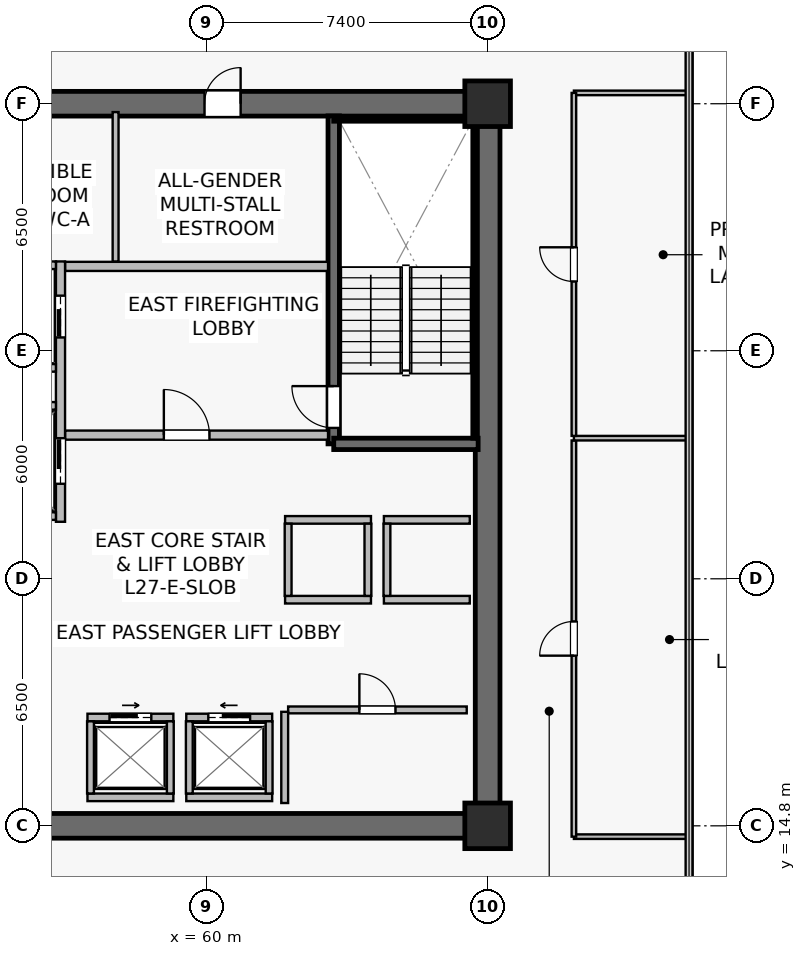
"""IFC4 building model, lengths in metres.
Left out: names, types, materials, properties, quantities, classifications, styles, units other than length and angle.
Written with IfcOpenShell. Run it as: python <this file> out.ifc"""

import sys

from ifc_helpers import new_model, si_unit, direction, frame, frame_2d, origin, origin_2d, place, context, subcontext, project, spatial, rectangle, extrude, source, transform, mapped, element, fill, save


model = new_model("IFC4")
c1 = context("Model", 3, precision=1e-05, world=origin(), true_north=direction((0.0, 1.0)))
c2 = subcontext(c1, "Body", "Model", "MODEL_VIEW")
j1 = project(units=[si_unit("LENGTHUNIT", "METRE"), si_unit("PLANEANGLEUNIT", "RADIAN")], contexts=[c1])
p1 = place(None, origin())
s1 = spatial("IfcSite", under=j1, at=p1, CompositionType="ELEMENT")
p2 = place(p1, origin())
s2 = spatial("IfcBuilding", under=s1, at=p2, CompositionType="ELEMENT")
p3 = place(p2, frame((0.0, 0.0, 113.3)))
s3 = spatial("IfcBuildingStorey", under=s2, at=p3, CompositionType="ELEMENT", Elevation=113.3)
p4 = place(p3, frame((52.275, 14.8, 0.0), z_axis=(0.0, 0.0, 1.0), x_axis=(1.0, 0.0, 0.0)))
e1 = element("IfcWall", 1, at=p4, inside=s3, PredefinedType="SHEAR", context=c2, shape_type="SweptSolid", body=[
    extrude(rectangle(XDim=15.45, YDim=0.65, at=frame_2d((7.725, 0.0))), origin(), (0.0, 0.0, 1.0), 3.79),
])
p5 = place(p3, frame((52.275, 33.8, 0.0), z_axis=(0.0, 0.0, 1.0), x_axis=(1.0, 0.0, 0.0)))
e2 = element("IfcWall", 2, at=p5, inside=s3, PredefinedType="SHEAR", context=c2, shape_type="SweptSolid", body=[
    extrude(rectangle(XDim=15.45, YDim=0.65, at=frame_2d((7.725, 0.0))), origin(), (0.0, 0.0, 1.0), 3.79),
])
p6 = place(p5, frame((7.675, 0.0, 0.0)))
e3 = element("IfcOpeningElement", 3, at=p6, cuts=e2, PredefinedType="OPENING", context=c2, shape_type="SweptSolid", body=[
    extrude(rectangle(XDim=0.95, YDim=2.15, at=frame_2d((0.475, 1.075))), frame((0.0, 0.335, 0.0), z_axis=(0.0, -1.0, 0.0), x_axis=(1.0, 0.0, 0.0)), (0.0, 0.0, 1.0), 0.67),
])
p7 = place(p5, frame((2.61, 0.0, 0.0)))
e4 = element("IfcOpeningElement", 4, at=p7, cuts=e2, PredefinedType="OPENING", context=c2, shape_type="SweptSolid", body=[
    extrude(rectangle(XDim=0.95, YDim=2.15, at=frame_2d((0.475, 1.075))), frame((0.0, 0.335, 0.0), z_axis=(0.0, -1.0, 0.0), x_axis=(1.0, 0.0, 0.0)), (0.0, 0.0, 1.0), 0.67),
])
p8 = place(p3, frame((67.4, 15.125, 0.0), z_axis=(0.0, 0.0, 1.0), x_axis=(0.0, 1.0, 0.0)))
e5 = element("IfcWall", 5, at=p8, inside=s3, PredefinedType="SHEAR", context=c2, shape_type="SweptSolid", body=[
    extrude(rectangle(XDim=18.35, YDim=0.65, at=frame_2d((9.175, 0.0))), origin(), (0.0, 0.0, 1.0), 3.79),
])
p9 = place(p3, frame((63.35, 24.85, 0.0), z_axis=(0.0, 0.0, 1.0), x_axis=(0.0, 1.0, 0.0)))
e6 = element("IfcWall", 6, at=p9, inside=s3, PredefinedType="SHEAR", context=c2, shape_type="SweptSolid", body=[
    extrude(rectangle(XDim=8.63, YDim=0.3, at=frame_2d((4.315, 0.0))), origin(), (0.0, 0.0, 1.0), 3.79),
])
p10 = place(p9, frame((0.42, 0.0, 0.0)))
e7 = element("IfcOpeningElement", 7, at=p10, cuts=e6, PredefinedType="OPENING", context=c2, shape_type="SweptSolid", body=[
    extrude(rectangle(XDim=1.1, YDim=2.15, at=frame_2d((0.55, 1.075))), frame((0.0, 0.16, 0.0), z_axis=(0.0, -1.0, 0.0), x_axis=(1.0, 0.0, 0.0)), (0.0, 0.0, 1.0), 0.32),
])
p11 = place(p3, frame((63.35, 24.85, 0.0), z_axis=(0.0, 0.0, 1.0), x_axis=(1.0, 0.0, 0.0)))
e8 = element("IfcWall", 8, at=p11, inside=s3, PredefinedType="SHEAR", context=c2, shape_type="SweptSolid", body=[
    extrude(rectangle(XDim=3.8, YDim=0.3, at=frame_2d((1.9, 0.0))), origin(), (0.0, 0.0, 1.0), 3.79),
])
p12 = place(p3, frame((63.35, 33.4, 0.0), z_axis=(0.0, 0.0, 1.0), x_axis=(1.0, 0.0, 0.0)))
e9 = element("IfcWall", 9, at=p12, inside=s3, PredefinedType="SOLIDWALL", context=c2, shape_type="SweptSolid", body=[
    extrude(rectangle(XDim=3.72, YDim=0.12, at=frame_2d((1.86, 0.0))), origin(), (0.0, 0.0, 1.0), 3.79),
])
p13 = place(p3, frame((67.07, 25.0, 0.0), z_axis=(0.0, 0.0, 1.0), x_axis=(0.0, 1.0, 0.0)))
e10 = element("IfcWall", 10, at=p13, inside=s3, PredefinedType="SOLIDWALL", context=c2, shape_type="SweptSolid", body=[
    extrude(rectangle(XDim=8.32, YDim=0.12, at=frame_2d((4.16, 0.0))), origin(), (0.0, 0.0, 1.0), 3.79),
])
m1 = source(origin(), c2, "Body", "SweptSolid", [
    extrude(rectangle(XDim=1.2, YDim=1.2, at=origin_2d()), origin(), (0.0, 0.0, 1.0), 4.1),
])
for number, where, z_axis, x_axis in (
    (11, (67.4, 14.8, 0.0), (0.0, 0.0, 1.0), (1.0, 0.0, 0.0)),
    (12, (67.4, 33.8, 0.0), (0.0, 0.0, 1.0), (1.0, 0.0, 0.0)),
):
    element("IfcColumn", number, at=place(p3, frame(where, z_axis=z_axis, x_axis=x_axis)), inside=s3, PredefinedType="COLUMN", context=c2, shape_type="MappedRepresentation", body=[
        mapped(m1, transform((0.0, 0.0, 0.0), scale=1.0)),
    ])
p14 = place(p3, frame((56.28, 25.08, 0.0), z_axis=(0.0, 0.0, 1.0), x_axis=(1.0, 0.0, 0.0)))
e13 = element("IfcWall", 13, at=p14, inside=s3, PredefinedType="SOLIDWALL", context=c2, shape_type="SweptSolid", body=[
    extrude(rectangle(XDim=6.92, YDim=0.24, at=frame_2d((3.46, 0.0))), origin(), (0.0, 0.0, 1.0), 3.125),
])
p15 = place(p14, frame((2.6, 0.0, 0.0)))
e14 = element("IfcOpeningElement", 14, at=p15, cuts=e13, PredefinedType="OPENING", context=c2, shape_type="SweptSolid", body=[
    extrude(rectangle(XDim=1.2, YDim=2.16, at=frame_2d((0.6, 1.08))), frame((0.0, 0.13, 0.0), z_axis=(0.0, -1.0, 0.0), x_axis=(1.0, 0.0, 0.0)), (0.0, 0.0, 1.0), 0.26),
])
p16 = place(p3, frame((56.28, 29.52, 0.0), z_axis=(0.0, 0.0, 1.0), x_axis=(1.0, 0.0, 0.0)))
e15 = element("IfcWall", 15, at=p16, inside=s3, PredefinedType="SOLIDWALL", context=c2, shape_type="SweptSolid", body=[
    extrude(rectangle(XDim=6.92, YDim=0.24, at=frame_2d((3.46, 0.0))), origin(), (0.0, 0.0, 1.0), 3.125),
])
p17 = place(p3, frame((56.16, 22.8, 0.0), z_axis=(0.0, 0.0, 1.0), x_axis=(0.0, 1.0, 0.0)))
e16 = element("IfcWall", 16, at=p17, inside=s3, PredefinedType="SOLIDWALL", context=c2, shape_type="SweptSolid", body=[
    extrude(rectangle(XDim=6.85, YDim=0.24, at=frame_2d((3.425, 0.0))), origin(), (0.0, 0.0, 1.0), 2.875),
])
p18 = place(p17, frame((4.85, 0.0, 0.0)))
e17 = element("IfcOpeningElement", 17, at=p18, cuts=e16, PredefinedType="OPENING", context=c2, shape_type="SweptSolid", body=[
    extrude(rectangle(XDim=1.1, YDim=2.22, at=frame_2d((0.55, 1.11))), frame((0.0, 0.13, 0.0), z_axis=(0.0, -1.0, 0.0), x_axis=(1.0, 0.0, 0.0)), (0.0, 0.0, 1.0), 0.26),
])
p19 = place(p17, frame((1.0, 0.0, 0.0)))
e18 = element("IfcOpeningElement", 18, at=p19, cuts=e16, PredefinedType="OPENING", context=c2, shape_type="SweptSolid", body=[
    extrude(rectangle(XDim=1.2, YDim=2.22, at=frame_2d((0.6, 1.11))), frame((0.0, 0.13, 0.0), z_axis=(0.0, -1.0, 0.0), x_axis=(1.0, 0.0, 0.0)), (0.0, 0.0, 1.0), 0.26),
])
p20 = place(p3, frame((59.47, 17.65, 0.0), z_axis=(0.0, 0.0, 1.0), x_axis=(1.0, 0.0, 0.0)))
e19 = element("IfcWall", 19, at=p20, inside=s3, PredefinedType="SOLIDWALL", context=c2, shape_type="SweptSolid", body=[
    extrude(rectangle(XDim=2.26, YDim=0.2, at=frame_2d((1.13, 0.0))), origin(), (0.0, 0.0, 1.0), 3.125),
])
p21 = place(p20, frame((0.58, 0.0, 0.0)))
e20 = element("IfcOpeningElement", 20, at=p21, cuts=e19, PredefinedType="OPENING", context=c2, shape_type="SweptSolid", body=[
    extrude(rectangle(XDim=1.1, YDim=2.22, at=frame_2d((0.55, 1.11))), frame((0.0, 0.11, 0.0), z_axis=(0.0, -1.0, 0.0), x_axis=(1.0, 0.0, 0.0)), (0.0, 0.0, 1.0), 0.22),
])
p22 = place(p3, frame((59.47, 15.55, 0.0), z_axis=(0.0, 0.0, 1.0), x_axis=(1.0, 0.0, 0.0)))
e21 = element("IfcWall", 21, at=p22, inside=s3, PredefinedType="SOLIDWALL", context=c2, shape_type="SweptSolid", body=[
    extrude(rectangle(XDim=2.26, YDim=0.2, at=frame_2d((1.13, 0.0))), origin(), (0.0, 0.0, 1.0), 3.125),
])
for number, where, z_axis, x_axis in (
    (22, (59.55, 15.65, 0.0), (0.0, 0.0, 1.0), (0.0, 1.0, 0.0)),
    (23, (61.65, 15.65, 0.0), (0.0, 0.0, 1.0), (0.0, 1.0, 0.0)),
):
    element("IfcWall", number, at=place(p3, frame(where, z_axis=z_axis, x_axis=x_axis)), inside=s3, PredefinedType="SOLIDWALL", context=c2, shape_type="SweptSolid", body=[
        extrude(rectangle(XDim=1.9, YDim=0.18, at=frame_2d((0.95, 0.0))), origin(), (0.0, 0.0, 1.0), 3.79),
    ])
p23 = place(p3, frame((56.87, 17.65, 0.0), z_axis=(0.0, 0.0, 1.0), x_axis=(1.0, 0.0, 0.0)))
e24 = element("IfcWall", 24, at=p23, inside=s3, PredefinedType="SOLIDWALL", context=c2, shape_type="SweptSolid", body=[
    extrude(rectangle(XDim=2.26, YDim=0.2, at=frame_2d((1.13, 0.0))), origin(), (0.0, 0.0, 1.0), 3.79),
])
p24 = place(p23, frame((0.58, 0.0, 0.0)))
e25 = element("IfcOpeningElement", 25, at=p24, cuts=e24, PredefinedType="OPENING", context=c2, shape_type="SweptSolid", body=[
    extrude(rectangle(XDim=1.1, YDim=2.22, at=frame_2d((0.55, 1.11))), frame((0.0, 0.11, 0.0), z_axis=(0.0, -1.0, 0.0), x_axis=(1.0, 0.0, 0.0)), (0.0, 0.0, 1.0), 0.22),
])
p25 = place(p3, frame((56.87, 15.55, 0.0), z_axis=(0.0, 0.0, 1.0), x_axis=(1.0, 0.0, 0.0)))
e26 = element("IfcWall", 26, at=p25, inside=s3, PredefinedType="SOLIDWALL", context=c2, shape_type="SweptSolid", body=[
    extrude(rectangle(XDim=2.26, YDim=0.2, at=frame_2d((1.13, 0.0))), origin(), (0.0, 0.0, 1.0), 3.79),
])
for number, where, z_axis, x_axis in (
    (27, (56.95, 15.65, 0.0), (0.0, 0.0, 1.0), (0.0, 1.0, 0.0)),
    (28, (59.05, 15.65, 0.0), (0.0, 0.0, 1.0), (0.0, 1.0, 0.0)),
):
    element("IfcWall", number, at=place(p3, frame(where, z_axis=z_axis, x_axis=x_axis)), inside=s3, PredefinedType="SOLIDWALL", context=c2, shape_type="SweptSolid", body=[
        extrude(rectangle(XDim=1.9, YDim=0.18, at=frame_2d((0.95, 0.0))), origin(), (0.0, 0.0, 1.0), 3.79),
    ])
for number, where, z_axis, x_axis in (
    (29, (64.67, 20.75, 0.0), (0.0, 0.0, 1.0), (1.0, 0.0, 0.0)),
    (30, (64.67, 22.85, 0.0), (0.0, 0.0, 1.0), (1.0, 0.0, 0.0)),
):
    element("IfcWall", number, at=place(p3, frame(where, z_axis=z_axis, x_axis=x_axis)), inside=s3, PredefinedType="SOLIDWALL", context=c2, shape_type="SweptSolid", body=[
        extrude(rectangle(XDim=2.26, YDim=0.2, at=frame_2d((1.13, 0.0))), origin(), (0.0, 0.0, 1.0), 3.79),
    ])
p26 = place(p3, frame((64.75, 20.85, 0.0), z_axis=(0.0, 0.0, 1.0), x_axis=(0.0, 1.0, 0.0)))
e31 = element("IfcWall", 31, at=p26, inside=s3, PredefinedType="SOLIDWALL", context=c2, shape_type="SweptSolid", body=[
    extrude(rectangle(XDim=1.9, YDim=0.18, at=frame_2d((0.95, 0.0))), origin(), (0.0, 0.0, 1.0), 3.79),
])
for number, where, z_axis, x_axis in (
    (32, (62.07, 20.75, 0.0), (0.0, 0.0, 1.0), (1.0, 0.0, 0.0)),
    (33, (62.07, 22.85, 0.0), (0.0, 0.0, 1.0), (1.0, 0.0, 0.0)),
):
    element("IfcWall", number, at=place(p3, frame(where, z_axis=z_axis, x_axis=x_axis)), inside=s3, PredefinedType="SOLIDWALL", context=c2, shape_type="SweptSolid", body=[
        extrude(rectangle(XDim=2.26, YDim=0.2, at=frame_2d((1.13, 0.0))), origin(), (0.0, 0.0, 1.0), 3.79),
    ])
for number, where, z_axis, x_axis in (
    (34, (62.15, 20.85, 0.0), (0.0, 0.0, 1.0), (0.0, 1.0, 0.0)),
    (35, (64.25, 20.85, 0.0), (0.0, 0.0, 1.0), (0.0, 1.0, 0.0)),
):
    element("IfcWall", number, at=place(p3, frame(where, z_axis=z_axis, x_axis=x_axis)), inside=s3, PredefinedType="SOLIDWALL", context=c2, shape_type="SweptSolid", body=[
        extrude(rectangle(XDim=1.9, YDim=0.18, at=frame_2d((0.95, 0.0))), origin(), (0.0, 0.0, 1.0), 3.79),
    ])
p27 = place(p3, frame((53.85, 29.55, 0.0), z_axis=(0.0, 0.0, 1.0), x_axis=(1.0, 0.0, 0.0)))
e36 = element("IfcWall", 36, at=p27, inside=s3, PredefinedType="SOLIDWALL", context=c2, shape_type="SweptSolid", body=[
    extrude(rectangle(XDim=2.19, YDim=0.2, at=frame_2d((1.095, 0.0))), origin(), (0.0, 0.0, 1.0), 3.79),
])
p28 = place(p3, frame((53.85, 26.85, 0.0), z_axis=(0.0, 0.0, 1.0), x_axis=(1.0, 0.0, 0.0)))
e37 = element("IfcWall", 37, at=p28, inside=s3, PredefinedType="SOLIDWALL", context=c2, shape_type="SweptSolid", body=[
    extrude(rectangle(XDim=2.19, YDim=0.2, at=frame_2d((1.095, 0.0))), origin(), (0.0, 0.0, 1.0), 3.187),
])
for number, where, z_axis, x_axis in (
    (38, (53.85, 25.85, 0.0), (0.0, 0.0, 1.0), (1.0, 0.0, 0.0)),
    (39, (53.85, 22.95, 0.0), (0.0, 0.0, 1.0), (1.0, 0.0, 0.0)),
):
    element("IfcWall", number, at=place(p3, frame(where, z_axis=z_axis, x_axis=x_axis)), inside=s3, PredefinedType="SOLIDWALL", context=c2, shape_type="SweptSolid", body=[
        extrude(rectangle(XDim=2.19, YDim=0.2, at=frame_2d((1.095, 0.0))), origin(), (0.0, 0.0, 1.0), 3.79),
    ])
p29 = place(p3, frame((62.15, 17.85, 0.0), z_axis=(0.0, 0.0, 1.0), x_axis=(1.0, 0.0, 0.0)))
e40 = element("IfcWall", 40, at=p29, inside=s3, PredefinedType="SOLIDWALL", context=c2, shape_type="SweptSolid", body=[
    extrude(rectangle(XDim=4.7, YDim=0.18, at=frame_2d((2.35, 0.0))), origin(), (0.0, 0.0, 1.0), 3.79),
])
p30 = place(p29, frame((1.875, 0.0, 0.0)))
e41 = element("IfcOpeningElement", 41, at=p30, cuts=e40, PredefinedType="OPENING", context=c2, shape_type="SweptSolid", body=[
    extrude(rectangle(XDim=0.95, YDim=2.15, at=frame_2d((0.475, 1.075))), frame((0.0, 0.1, 0.0), z_axis=(0.0, -1.0, 0.0), x_axis=(1.0, 0.0, 0.0)), (0.0, 0.0, 1.0), 0.2),
])
p31 = place(p3, frame((62.06, 15.4, 0.0), z_axis=(0.0, 0.0, 1.0), x_axis=(0.0, 1.0, 0.0)))
e42 = element("IfcWall", 42, at=p31, inside=s3, PredefinedType="SOLIDWALL", context=c2, shape_type="SweptSolid", body=[
    extrude(rectangle(XDim=2.4, YDim=0.18, at=frame_2d((1.2, 0.0))), origin(), (0.0, 0.0, 1.0), 3.79),
])
p32 = place(p3, frame((57.61, 29.65, 0.0), z_axis=(0.0, 0.0, 1.0), x_axis=(0.0, 1.0, 0.0)))
e43 = element("IfcWall", 43, at=p32, inside=s3, PredefinedType="PLUMBINGWALL", context=c2, shape_type="SweptSolid", body=[
    extrude(rectangle(XDim=3.93, YDim=0.155, at=frame_2d((1.965, 0.0))), origin(), (0.0, 0.0, 1.0), 3.79),
])
for number, where, z_axis, x_axis in (
    (44, (69.67, 14.515, 0.0), (0.0, 0.0, 1.0), (1.0, 0.0, 0.0)),
    (45, (69.67, 34.085, 0.0), (0.0, 0.0, 1.0), (1.0, 0.0, 0.0)),
):
    element("IfcWall", number, at=place(p3, frame(where, z_axis=z_axis, x_axis=x_axis)), inside=s3, PredefinedType="PARTITIONING", context=c2, shape_type="SweptSolid", body=[
        extrude(rectangle(XDim=3.02, YDim=0.12, at=frame_2d((1.51, 0.0))), origin(), (0.0, 0.0, 1.0), 3.79),
    ])
p33 = place(p3, frame((69.67, 14.515, 0.0), z_axis=(0.0, 0.0, 1.0), x_axis=(0.0, 1.0, 0.0)))
e46 = element("IfcWall", 46, at=p33, inside=s3, PredefinedType="PARTITIONING", context=c2, shape_type="SweptSolid", body=[
    extrude(rectangle(XDim=10.425, YDim=0.12, at=frame_2d((5.212, 0.0))), origin(), (0.0, 0.0, 1.0), 3.79),
])
p34 = place(p33, frame((4.762, 0.0, 0.0)))
e47 = element("IfcOpeningElement", 47, at=p34, cuts=e46, PredefinedType="OPENING", context=c2, shape_type="SweptSolid", body=[
    extrude(rectangle(XDim=0.9, YDim=2.1, at=frame_2d((0.45, 1.05))), frame((0.0, 0.07, 0.0), z_axis=(0.0, -1.0, 0.0), x_axis=(1.0, 0.0, 0.0)), (0.0, 0.0, 1.0), 0.14),
])
p35 = place(p3, frame((69.67, 25.0, 0.0), z_axis=(0.0, 0.0, 1.0), x_axis=(1.0, 0.0, 0.0)))
e48 = element("IfcWall", 48, at=p35, inside=s3, PredefinedType="PARTITIONING", context=c2, shape_type="SweptSolid", body=[
    extrude(rectangle(XDim=3.02, YDim=0.12, at=frame_2d((1.51, 0.0))), origin(), (0.0, 0.0, 1.0), 3.79),
])
p36 = place(p3, frame((69.67, 25.06, 0.0), z_axis=(0.0, 0.0, 1.0), x_axis=(0.0, 1.0, 0.0)))
e49 = element("IfcWall", 49, at=p36, inside=s3, PredefinedType="PARTITIONING", context=c2, shape_type="SweptSolid", body=[
    extrude(rectangle(XDim=9.025, YDim=0.12, at=frame_2d((4.512, 0.0))), origin(), (0.0, 0.0, 1.0), 3.79),
])
p37 = place(p36, frame((4.062, 0.0, 0.0)))
e50 = element("IfcOpeningElement", 50, at=p37, cuts=e49, PredefinedType="OPENING", context=c2, shape_type="SweptSolid", body=[
    extrude(rectangle(XDim=0.9, YDim=2.1, at=frame_2d((0.45, 1.05))), frame((0.0, 0.07, 0.0), z_axis=(0.0, -1.0, 0.0), x_axis=(1.0, 0.0, 0.0)), (0.0, 0.0, 1.0), 0.14),
])
m2 = source(origin(), c2, "Body", "SweptSolid", [
    extrude(rectangle(XDim=1.1, YDim=2.15, at=frame_2d((0.55, 1.075))), frame((0.0, 0.025, 0.0), z_axis=(0.0, -1.0, 0.0), x_axis=(1.0, 0.0, 0.0)), (0.0, 0.0, 1.0), 0.05),
])
p38 = place(p10, origin())
e51 = element("IfcDoor", 51, at=p38, inside=s3, OperationType="SINGLE_SWING_RIGHT", PredefinedType="DOOR", context=c2, shape_type="MappedRepresentation", body=[
    mapped(m2, transform((0.0, 0.0, 0.0), scale=1.0)),
])
fill(e7, e51)
m3 = source(origin(), c2, "Body", "SweptSolid", [
    extrude(rectangle(XDim=1.2, YDim=2.16, at=frame_2d((0.6, 1.08))), frame((0.0, 0.025, 0.0), z_axis=(0.0, -1.0, 0.0), x_axis=(1.0, 0.0, 0.0)), (0.0, 0.0, 1.0), 0.05),
])
p39 = place(p15, origin())
e52 = element("IfcDoor", 52, at=p39, inside=s3, OperationType="SINGLE_SWING_LEFT", PredefinedType="DOOR", context=c2, shape_type="MappedRepresentation", body=[
    mapped(m3, transform((0.0, 0.0, 0.0), scale=1.0)),
])
fill(e14, e52)
m4 = source(origin(), c2, "Body", "SweptSolid", [
    extrude(rectangle(XDim=1.1, YDim=2.22, at=frame_2d((0.55, 1.11))), frame((0.0, 0.025, 0.0), z_axis=(0.0, -1.0, 0.0), x_axis=(1.0, 0.0, 0.0)), (0.0, 0.0, 1.0), 0.05),
])
p40 = place(p21, origin())
e53 = element("IfcDoor", 53, at=p40, inside=s3, OperationType="SLIDING_TO_LEFT", PredefinedType="USERDEFINED", context=c2, shape_type="MappedRepresentation", body=[
    mapped(m4, transform((0.0, 0.0, 0.0), scale=1.0)),
])
fill(e20, e53)
p41 = place(p24, origin())
e54 = element("IfcDoor", 54, at=p41, inside=s3, OperationType="SLIDING_TO_RIGHT", PredefinedType="USERDEFINED", context=c2, shape_type="MappedRepresentation", body=[
    mapped(m4, transform((0.0, 0.0, 0.0), scale=1.0)),
])
fill(e25, e54)
p42 = place(p18, origin())
e55 = element("IfcDoor", 55, at=p42, inside=s3, OperationType="SLIDING_TO_RIGHT", PredefinedType="USERDEFINED", context=c2, shape_type="MappedRepresentation", body=[
    mapped(m4, transform((0.0, 0.0, 0.0), scale=1.0)),
])
fill(e17, e55)
m5 = source(origin(), c2, "Body", "SweptSolid", [
    extrude(rectangle(XDim=1.2, YDim=2.22, at=frame_2d((0.6, 1.11))), frame((0.0, 0.025, 0.0), z_axis=(0.0, -1.0, 0.0), x_axis=(1.0, 0.0, 0.0)), (0.0, 0.0, 1.0), 0.05),
])
p43 = place(p19, origin())
e56 = element("IfcDoor", 56, at=p43, inside=s3, OperationType="SLIDING_TO_LEFT", PredefinedType="USERDEFINED", context=c2, shape_type="MappedRepresentation", body=[
    mapped(m5, transform((0.0, 0.0, 0.0), scale=1.0)),
])
fill(e18, e56)
m6 = source(origin(), c2, "Body", "SweptSolid", [
    extrude(rectangle(XDim=0.95, YDim=2.15, at=frame_2d((0.475, 1.075))), frame((0.0, 0.025, 0.0), z_axis=(0.0, -1.0, 0.0), x_axis=(1.0, 0.0, 0.0)), (0.0, 0.0, 1.0), 0.05),
])
p44 = place(p30, origin())
e57 = element("IfcDoor", 57, at=p44, inside=s3, OperationType="SINGLE_SWING_LEFT", PredefinedType="DOOR", context=c2, shape_type="MappedRepresentation", body=[
    mapped(m6, transform((0.0, 0.0, 0.0), scale=1.0)),
])
fill(e41, e57)
p45 = place(p6, origin())
e58 = element("IfcDoor", 58, at=p45, inside=s3, OperationType="SINGLE_SWING_RIGHT", PredefinedType="DOOR", context=c2, shape_type="MappedRepresentation", body=[
    mapped(m6, transform((0.0, 0.0, 0.0), scale=1.0)),
])
fill(e3, e58)
m7 = source(origin(), c2, "Body", "SweptSolid", [
    extrude(rectangle(XDim=0.9, YDim=2.1, at=frame_2d((0.45, 1.05))), frame((0.0, 0.025, 0.0), z_axis=(0.0, -1.0, 0.0), x_axis=(1.0, 0.0, 0.0)), (0.0, 0.0, 1.0), 0.05),
])
p46 = place(p34, origin())
e59 = element("IfcDoor", 59, at=p46, inside=s3, OperationType="SINGLE_SWING_LEFT", PredefinedType="DOOR", context=c2, shape_type="MappedRepresentation", body=[
    mapped(m7, transform((0.0, 0.0, 0.0), scale=1.0)),
])
fill(e47, e59)
p47 = place(p37, origin())
e60 = element("IfcDoor", 60, at=p47, inside=s3, OperationType="SINGLE_SWING_RIGHT", PredefinedType="DOOR", context=c2, shape_type="MappedRepresentation", body=[
    mapped(m7, transform((0.0, 0.0, 0.0), scale=1.0)),
])
fill(e50, e60)
save(model, sys.argv[1])
